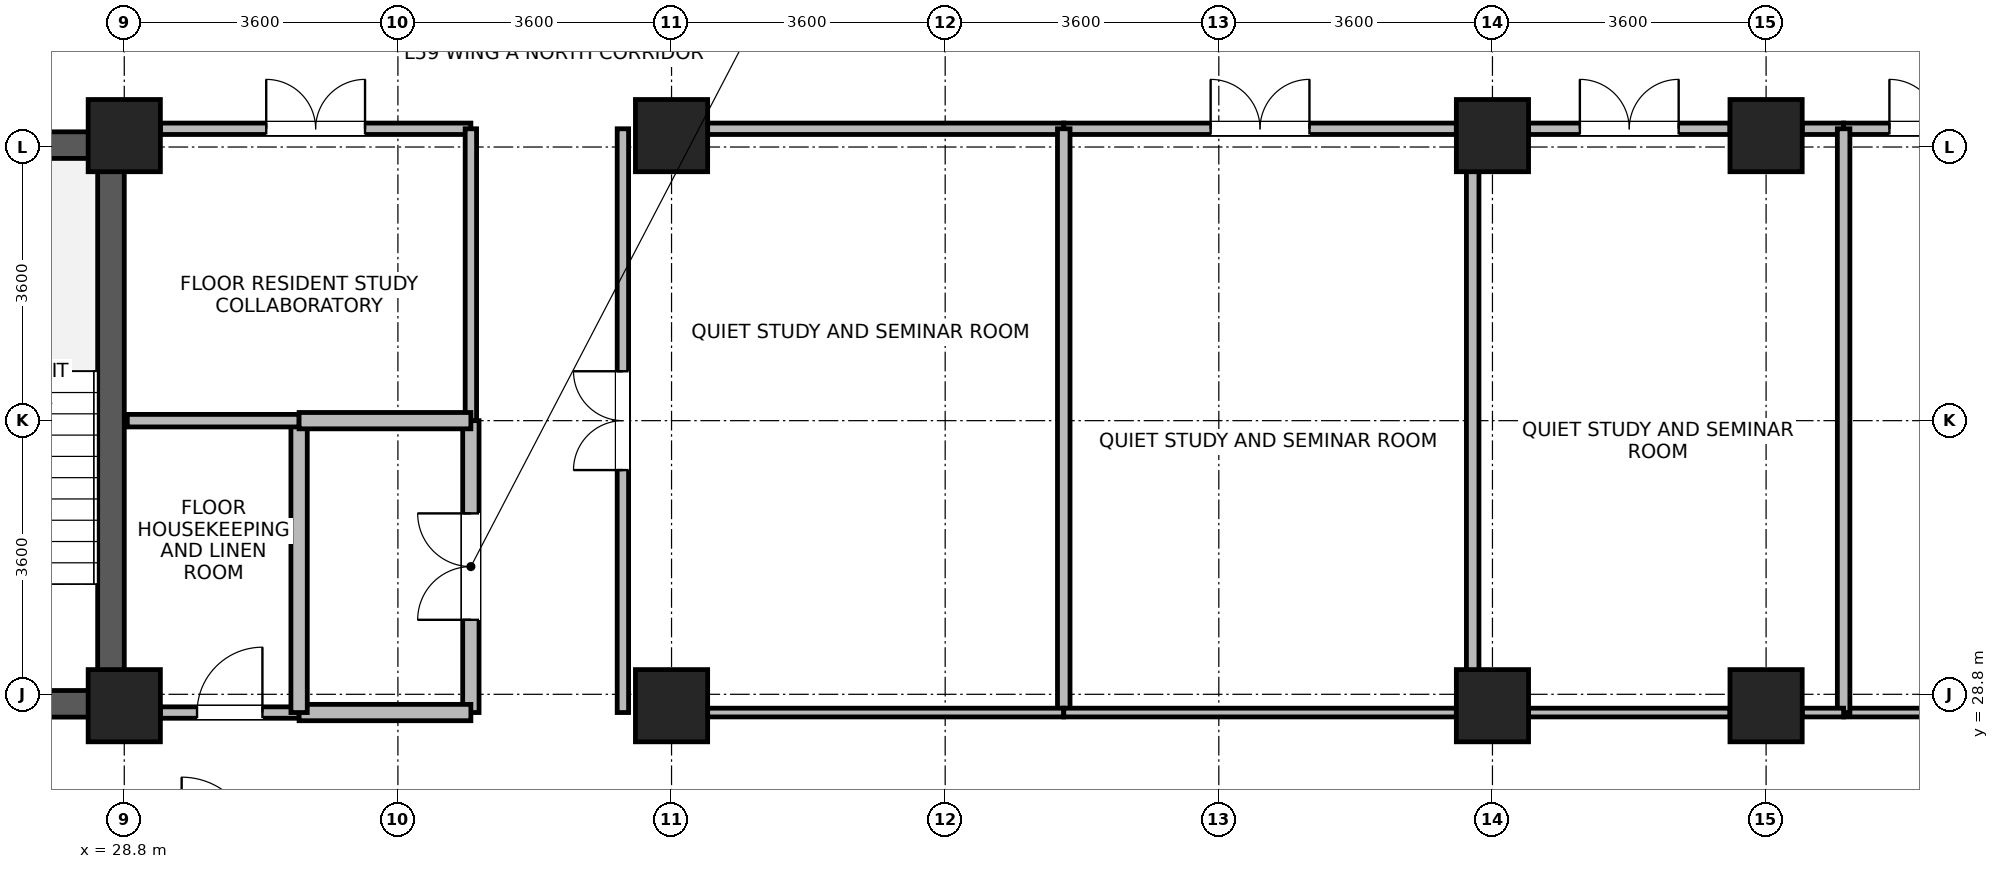
"""IFC4 building model, lengths in metres.
Left out: names, types, materials, properties, quantities, classifications, styles, units other than length and angle.
Written with IfcOpenShell. Run it as: python <this file> out.ifc"""

import sys

from ifc_helpers import new_model, si_unit, direction, frame, frame_2d, origin, origin_2d, place, context, subcontext, project, spatial, rectangle, extrude, source, transform, mapped, element, fill, save


model = new_model("IFC4")
c1 = context("Model", 3, precision=1e-05, world=origin(), true_north=direction((0.0, 1.0)))
c2 = subcontext(c1, "Body", "Model", "MODEL_VIEW")
j1 = project(units=[si_unit("LENGTHUNIT", "METRE"), si_unit("PLANEANGLEUNIT", "RADIAN")], contexts=[c1])
p1 = place(None, origin())
s1 = spatial("IfcSite", under=j1, at=p1, CompositionType="ELEMENT")
p2 = place(p1, origin())
s2 = spatial("IfcBuilding", under=s1, at=p2, CompositionType="ELEMENT")
p3 = place(p2, frame((0.0, 0.0, 231.4)))
s3 = spatial("IfcBuildingStorey", under=s2, at=p3, CompositionType="ELEMENT", Elevation=231.4)
p4 = place(p3, frame((28.625, 28.5, 0.0), z_axis=(0.0, 0.0, 1.0), x_axis=(0.0, 1.0, 0.0)))
e1 = element("IfcWall", 1, at=p4, inside=s3, PredefinedType="SHEAR", context=c2, shape_type="SweptSolid", body=[
    extrude(rectangle(XDim=7.7, YDim=0.35, at=frame_2d((3.85, 0.0))), origin(), (0.0, 0.0, 1.0), 3.44),
])
for number, where, z_axis, x_axis in (
    (2, (25.25, 28.675, 0.0), (0.0, 0.0, 1.0), (1.0, 0.0, 0.0)),
    (3, (25.25, 36.025, 0.0), (0.0, 0.0, 1.0), (1.0, 0.0, 0.0)),
):
    element("IfcWall", number, at=place(p3, frame(where, z_axis=z_axis, x_axis=x_axis)), inside=s3, PredefinedType="SHEAR", context=c2, shape_type="SweptSolid", body=[
        extrude(rectangle(XDim=3.2, YDim=0.35, at=frame_2d((1.6, 0.0))), origin(), (0.0, 0.0, 1.0), 3.44),
    ])
m1 = source(origin(), c2, "Body", "SweptSolid", [
    extrude(rectangle(XDim=0.95, YDim=0.95, at=origin_2d()), origin(), (0.0, 0.0, 1.0), 3.7),
])
for number, where, z_axis, x_axis in (
    (4, (28.8, 28.65, 0.0), (0.0, 0.0, 1.0), (1.0, 0.0, 0.0)),
    (5, (28.8, 36.15, 0.0), (0.0, 0.0, 1.0), (1.0, 0.0, 0.0)),
    (6, (36.0, 28.65, 0.0), (0.0, 0.0, 1.0), (1.0, 0.0, 0.0)),
    (7, (36.0, 36.15, 0.0), (0.0, 0.0, 1.0), (1.0, 0.0, 0.0)),
    (8, (46.8, 28.65, 0.0), (0.0, 0.0, 1.0), (1.0, 0.0, 0.0)),
    (9, (46.8, 36.15, 0.0), (0.0, 0.0, 1.0), (1.0, 0.0, 0.0)),
    (10, (50.4, 28.65, 0.0), (0.0, 0.0, 1.0), (1.0, 0.0, 0.0)),
    (11, (50.4, 36.15, 0.0), (0.0, 0.0, 1.0), (1.0, 0.0, 0.0)),
):
    element("IfcColumn", number, at=place(p3, frame(where, z_axis=z_axis, x_axis=x_axis)), inside=s3, PredefinedType="COLUMN", context=c2, shape_type="MappedRepresentation", body=[
        mapped(m1, transform((0.0, 0.0, 0.0), x_axis=(1.0, 0.0, 0.0), y_axis=(0.0, 1.0, 0.0), z_axis=(0.0, 0.0, 1.0), scale=1.0)),
    ])
p5 = place(p3, frame((51.42, 36.24, 0.0), z_axis=(0.0, 0.0, 1.0), x_axis=(1.0, 0.0, 0.0)))
e12 = element("IfcWall", 12, at=p5, inside=s3, PredefinedType="PARTITIONING", context=c2, shape_type="SweptSolid", body=[
    extrude(rectangle(XDim=2.505, YDim=0.15, at=frame_2d((1.252, 0.0))), origin(), (0.0, 0.0, 1.0), 2.87),
])
p6 = place(p5, frame((0.603, 0.0, 0.0)))
e13 = element("IfcOpeningElement", 13, at=p6, cuts=e12, PredefinedType="OPENING", context=c2, shape_type="SweptSolid", body=[
    extrude(rectangle(XDim=1.3, YDim=2.12, at=frame_2d((0.65, 1.06))), frame((0.0, 0.085, 0.0), z_axis=(0.0, -1.0, 0.0), x_axis=(1.0, 0.0, 0.0)), (0.0, 0.0, 1.0), 0.17),
])
p7 = place(p3, frame((35.36, 28.56, 0.0), z_axis=(0.0, 0.0, 1.0), x_axis=(0.0, 1.0, 0.0)))
e14 = element("IfcWall", 14, at=p7, inside=s3, PredefinedType="PARTITIONING", context=c2, shape_type="SweptSolid", body=[
    extrude(rectangle(XDim=7.68, YDim=0.15, at=frame_2d((3.84, 0.0))), origin(), (0.0, 0.0, 1.0), 3.42),
])
p8 = place(p7, frame((3.19, 0.0, 0.0)))
e15 = element("IfcOpeningElement", 15, at=p8, cuts=e14, PredefinedType="OPENING", context=c2, shape_type="SweptSolid", body=[
    extrude(rectangle(XDim=1.3, YDim=2.12, at=frame_2d((0.65, 1.06))), frame((0.0, 0.085, 0.0), z_axis=(0.0, -1.0, 0.0), x_axis=(1.0, 0.0, 0.0)), (0.0, 0.0, 1.0), 0.17),
])
p9 = place(p3, frame((36.475, 36.24, 0.0), z_axis=(0.0, 0.0, 1.0), x_axis=(1.0, 0.0, 0.0)))
e16 = element("IfcWall", 16, at=p9, inside=s3, PredefinedType="PARTITIONING", context=c2, shape_type="SweptSolid", body=[
    extrude(rectangle(XDim=4.685, YDim=0.15, at=frame_2d((2.342, 0.0))), origin(), (0.0, 0.0, 1.0), 2.87),
])
p10 = place(p3, frame((41.16, 36.24, 0.0), z_axis=(0.0, 0.0, 1.0), x_axis=(1.0, 0.0, 0.0)))
e17 = element("IfcWall", 17, at=p10, inside=s3, PredefinedType="PARTITIONING", context=c2, shape_type="SweptSolid", body=[
    extrude(rectangle(XDim=5.165, YDim=0.15, at=frame_2d((2.583, 0.0))), origin(), (0.0, 0.0, 1.0), 2.87),
])
p11 = place(p10, frame((1.933, 0.0, 0.0)))
e18 = element("IfcOpeningElement", 18, at=p11, cuts=e17, PredefinedType="OPENING", context=c2, shape_type="SweptSolid", body=[
    extrude(rectangle(XDim=1.3, YDim=2.12, at=frame_2d((0.65, 1.06))), frame((0.0, 0.085, 0.0), z_axis=(0.0, -1.0, 0.0), x_axis=(1.0, 0.0, 0.0)), (0.0, 0.0, 1.0), 0.17),
])
p12 = place(p3, frame((47.275, 36.24, 0.0), z_axis=(0.0, 0.0, 1.0), x_axis=(1.0, 0.0, 0.0)))
e19 = element("IfcWall", 19, at=p12, inside=s3, PredefinedType="PARTITIONING", context=c2, shape_type="SweptSolid", body=[
    extrude(rectangle(XDim=2.65, YDim=0.15, at=frame_2d((1.325, 0.0))), origin(), (0.0, 0.0, 1.0), 2.87),
])
p13 = place(p12, frame((0.675, 0.0, 0.0)))
e20 = element("IfcOpeningElement", 20, at=p13, cuts=e19, PredefinedType="OPENING", context=c2, shape_type="SweptSolid", body=[
    extrude(rectangle(XDim=1.3, YDim=2.12, at=frame_2d((0.65, 1.06))), frame((0.0, 0.085, 0.0), z_axis=(0.0, -1.0, 0.0), x_axis=(1.0, 0.0, 0.0)), (0.0, 0.0, 1.0), 0.17),
])
p14 = place(p3, frame((50.875, 36.24, 0.0), z_axis=(0.0, 0.0, 1.0), x_axis=(1.0, 0.0, 0.0)))
e21 = element("IfcWall", 21, at=p14, inside=s3, PredefinedType="PARTITIONING", context=c2, shape_type="SweptSolid", body=[
    extrude(rectangle(XDim=0.545, YDim=0.15, at=frame_2d((0.272, 0.0))), origin(), (0.0, 0.0, 1.0), 2.87),
])
p15 = place(p3, frame((29.275, 36.24, 0.0), z_axis=(0.0, 0.0, 1.0), x_axis=(1.0, 0.0, 0.0)))
e22 = element("IfcWall", 22, at=p15, inside=s3, PredefinedType="PARTITIONING", context=c2, shape_type="SweptSolid", body=[
    extrude(rectangle(XDim=4.085, YDim=0.15, at=frame_2d((2.042, 0.0))), origin(), (0.0, 0.0, 1.0), 2.87),
])
p16 = place(p15, frame((1.393, 0.0, 0.0)))
e23 = element("IfcOpeningElement", 23, at=p16, cuts=e22, PredefinedType="OPENING", context=c2, shape_type="SweptSolid", body=[
    extrude(rectangle(XDim=1.3, YDim=2.12, at=frame_2d((0.65, 1.06))), frame((0.0, 0.085, 0.0), z_axis=(0.0, -1.0, 0.0), x_axis=(1.0, 0.0, 0.0)), (0.0, 0.0, 1.0), 0.17),
])
p17 = place(p3, frame((33.36, 32.4, 0.0), z_axis=(0.0, 0.0, 1.0), x_axis=(0.0, 1.0, 0.0)))
e24 = element("IfcWall", 24, at=p17, inside=s3, PredefinedType="PARTITIONING", context=c2, shape_type="SweptSolid", body=[
    extrude(rectangle(XDim=3.84, YDim=0.15, at=frame_2d((1.92, 0.0))), origin(), (0.0, 0.0, 1.0), 3.42),
])
p18 = place(p3, frame((33.36, 28.56, 0.0), z_axis=(0.0, 0.0, 1.0), x_axis=(0.0, 1.0, 0.0)))
e25 = element("IfcWall", 25, at=p18, inside=s3, PredefinedType="PARTITIONING", context=c2, shape_type="SweptSolid", body=[
    extrude(rectangle(XDim=3.84, YDim=0.215, at=frame_2d((1.92, 0.0))), origin(), (0.0, 0.0, 1.0), 3.42),
])
p19 = place(p18, frame((1.22, 0.0, 0.0)))
e26 = element("IfcOpeningElement", 26, at=p19, cuts=e25, PredefinedType="OPENING", context=c2, shape_type="SweptSolid", body=[
    extrude(rectangle(XDim=1.4, YDim=2.15, at=frame_2d((0.7, 1.075))), frame((0.0, 0.118, 0.0), z_axis=(0.0, -1.0, 0.0), x_axis=(1.0, 0.0, 0.0)), (0.0, 0.0, 1.0), 0.235),
])
p20 = place(p3, frame((29.275, 28.56, 0.0), z_axis=(0.0, 0.0, 1.0), x_axis=(1.0, 0.0, 0.0)))
e27 = element("IfcWall", 27, at=p20, inside=s3, PredefinedType="PARTITIONING", context=c2, shape_type="SweptSolid", body=[
    extrude(rectangle(XDim=1.825, YDim=0.15, at=frame_2d((0.913, 0.0))), origin(), (0.0, 0.0, 1.0), 2.87),
])
p21 = place(p20, frame((0.482, 0.0, 0.0)))
e28 = element("IfcOpeningElement", 28, at=p21, cuts=e27, PredefinedType="OPENING", context=c2, shape_type="SweptSolid", body=[
    extrude(rectangle(XDim=0.86, YDim=2.02, at=frame_2d((0.43, 1.01))), frame((0.0, 0.085, 0.0), z_axis=(0.0, -1.0, 0.0), x_axis=(1.0, 0.0, 0.0)), (0.0, 0.0, 1.0), 0.17),
])
p22 = place(p3, frame((31.1, 28.56, 0.0), z_axis=(0.0, 0.0, 1.0), x_axis=(1.0, 0.0, 0.0)))
e29 = element("IfcWall", 29, at=p22, inside=s3, PredefinedType="PARTITIONING", context=c2, shape_type="SweptSolid", body=[
    extrude(rectangle(XDim=2.26, YDim=0.215, at=frame_2d((1.13, 0.0))), origin(), (0.0, 0.0, 1.0), 2.87),
])
p23 = place(p3, frame((51.42, 28.56, 0.0), z_axis=(0.0, 0.0, 1.0), x_axis=(1.0, 0.0, 0.0)))
e30 = element("IfcWall", 30, at=p23, inside=s3, PredefinedType="PARTITIONING", context=c2, shape_type="SweptSolid", body=[
    extrude(rectangle(XDim=2.505, YDim=0.115, at=frame_2d((1.252, 0.0))), origin(), (0.0, 0.0, 1.0), 2.87),
])
for number, where, z_axis, x_axis in (
    (31, (41.16, 28.56, 0.0), (0.0, 0.0, 1.0), (0.0, 1.0, 0.0)),
    (32, (46.54, 28.56, 0.0), (0.0, 0.0, 1.0), (0.0, 1.0, 0.0)),
    (33, (51.42, 28.56, 0.0), (0.0, 0.0, 1.0), (0.0, 1.0, 0.0)),
):
    element("IfcWall", number, at=place(p3, frame(where, z_axis=z_axis, x_axis=x_axis)), inside=s3, PredefinedType="PARTITIONING", context=c2, shape_type="SweptSolid", body=[
        extrude(rectangle(XDim=7.68, YDim=0.165, at=frame_2d((3.84, 0.0))), origin(), (0.0, 0.0, 1.0), 3.42),
    ])
p24 = place(p3, frame((36.475, 28.56, 0.0), z_axis=(0.0, 0.0, 1.0), x_axis=(1.0, 0.0, 0.0)))
e34 = element("IfcWall", 34, at=p24, inside=s3, PredefinedType="PARTITIONING", context=c2, shape_type="SweptSolid", body=[
    extrude(rectangle(XDim=4.685, YDim=0.115, at=frame_2d((2.342, 0.0))), origin(), (0.0, 0.0, 1.0), 2.87),
])
p25 = place(p3, frame((41.16, 28.56, 0.0), z_axis=(0.0, 0.0, 1.0), x_axis=(1.0, 0.0, 0.0)))
e35 = element("IfcWall", 35, at=p25, inside=s3, PredefinedType="PARTITIONING", context=c2, shape_type="SweptSolid", body=[
    extrude(rectangle(XDim=5.165, YDim=0.115, at=frame_2d((2.583, 0.0))), origin(), (0.0, 0.0, 1.0), 2.87),
])
p26 = place(p3, frame((47.275, 28.56, 0.0), z_axis=(0.0, 0.0, 1.0), x_axis=(1.0, 0.0, 0.0)))
e36 = element("IfcWall", 36, at=p26, inside=s3, PredefinedType="PARTITIONING", context=c2, shape_type="SweptSolid", body=[
    extrude(rectangle(XDim=2.65, YDim=0.115, at=frame_2d((1.325, 0.0))), origin(), (0.0, 0.0, 1.0), 2.87),
])
p27 = place(p3, frame((50.875, 28.56, 0.0), z_axis=(0.0, 0.0, 1.0), x_axis=(1.0, 0.0, 0.0)))
e37 = element("IfcWall", 37, at=p27, inside=s3, PredefinedType="PARTITIONING", context=c2, shape_type="SweptSolid", body=[
    extrude(rectangle(XDim=0.545, YDim=0.115, at=frame_2d((0.272, 0.0))), origin(), (0.0, 0.0, 1.0), 2.87),
])
p28 = place(p3, frame((31.1, 28.56, 0.0), z_axis=(0.0, 0.0, 1.0), x_axis=(0.0, 1.0, 0.0)))
e38 = element("IfcWall", 38, at=p28, inside=s3, PredefinedType="PARTITIONING", context=c2, shape_type="SweptSolid", body=[
    extrude(rectangle(XDim=3.84, YDim=0.215, at=frame_2d((1.92, 0.0))), origin(), (0.0, 0.0, 1.0), 3.42),
])
p29 = place(p3, frame((28.84, 32.4, 0.0), z_axis=(0.0, 0.0, 1.0), x_axis=(1.0, 0.0, 0.0)))
e39 = element("IfcWall", 39, at=p29, inside=s3, PredefinedType="PARTITIONING", context=c2, shape_type="SweptSolid", body=[
    extrude(rectangle(XDim=2.26, YDim=0.165, at=frame_2d((1.13, 0.0))), origin(), (0.0, 0.0, 1.0), 3.42),
])
p30 = place(p3, frame((31.1, 32.4, 0.0), z_axis=(0.0, 0.0, 1.0), x_axis=(1.0, 0.0, 0.0)))
e40 = element("IfcWall", 40, at=p30, inside=s3, PredefinedType="PARTITIONING", context=c2, shape_type="SweptSolid", body=[
    extrude(rectangle(XDim=2.26, YDim=0.215, at=frame_2d((1.13, 0.0))), origin(), (0.0, 0.0, 1.0), 3.42),
])
p31 = place(p6, origin())
e41 = element("IfcDoor", 41, at=p31, inside=s3, OperationType="DOUBLE_DOOR_SINGLE_SWING", PredefinedType="DOOR", context=c2, shape_type="SweptSolid", body=[
    extrude(rectangle(XDim=1.3, YDim=2.12, at=frame_2d((0.65, 1.06))), frame((0.0, 0.025, 0.0), z_axis=(0.0, -1.0, 0.0), x_axis=(1.0, 0.0, 0.0)), (0.0, 0.0, 1.0), 0.05),
])
fill(e13, e41)
p32 = place(p8, origin())
e42 = element("IfcDoor", 42, at=p32, inside=s3, OperationType="DOUBLE_DOOR_SINGLE_SWING", PredefinedType="DOOR", context=c2, shape_type="SweptSolid", body=[
    extrude(rectangle(XDim=1.3, YDim=2.12, at=frame_2d((0.65, 1.06))), frame((0.0, 0.025, 0.0), z_axis=(0.0, -1.0, 0.0), x_axis=(1.0, 0.0, 0.0)), (0.0, 0.0, 1.0), 0.05),
])
fill(e15, e42)
p33 = place(p11, origin())
e43 = element("IfcDoor", 43, at=p33, inside=s3, OperationType="DOUBLE_DOOR_SINGLE_SWING", PredefinedType="DOOR", context=c2, shape_type="SweptSolid", body=[
    extrude(rectangle(XDim=1.3, YDim=2.12, at=frame_2d((0.65, 1.06))), frame((0.0, 0.025, 0.0), z_axis=(0.0, -1.0, 0.0), x_axis=(1.0, 0.0, 0.0)), (0.0, 0.0, 1.0), 0.05),
])
fill(e18, e43)
p34 = place(p13, origin())
e44 = element("IfcDoor", 44, at=p34, inside=s3, OperationType="DOUBLE_DOOR_SINGLE_SWING", PredefinedType="DOOR", context=c2, shape_type="SweptSolid", body=[
    extrude(rectangle(XDim=1.3, YDim=2.12, at=frame_2d((0.65, 1.06))), frame((0.0, 0.025, 0.0), z_axis=(0.0, -1.0, 0.0), x_axis=(1.0, 0.0, 0.0)), (0.0, 0.0, 1.0), 0.05),
])
fill(e20, e44)
p35 = place(p16, origin())
e45 = element("IfcDoor", 45, at=p35, inside=s3, OperationType="DOUBLE_DOOR_SINGLE_SWING", PredefinedType="DOOR", context=c2, shape_type="SweptSolid", body=[
    extrude(rectangle(XDim=1.3, YDim=2.12, at=frame_2d((0.65, 1.06))), frame((0.0, 0.025, 0.0), z_axis=(0.0, -1.0, 0.0), x_axis=(1.0, 0.0, 0.0)), (0.0, 0.0, 1.0), 0.05),
])
fill(e23, e45)
p36 = place(p19, origin())
e46 = element("IfcDoor", 46, at=p36, inside=s3, OperationType="DOUBLE_DOOR_SINGLE_SWING", PredefinedType="DOOR", context=c2, shape_type="SweptSolid", body=[
    extrude(rectangle(XDim=1.4, YDim=2.15, at=frame_2d((0.7, 1.075))), frame((0.0, 0.025, 0.0), z_axis=(0.0, -1.0, 0.0), x_axis=(1.0, 0.0, 0.0)), (0.0, 0.0, 1.0), 0.05),
])
fill(e26, e46)
p37 = place(p21, origin())
e47 = element("IfcDoor", 47, at=p37, inside=s3, OperationType="SINGLE_SWING_RIGHT", PredefinedType="DOOR", context=c2, shape_type="SweptSolid", body=[
    extrude(rectangle(XDim=0.86, YDim=2.02, at=frame_2d((0.43, 1.01))), frame((0.0, 0.025, 0.0), z_axis=(0.0, -1.0, 0.0), x_axis=(1.0, 0.0, 0.0)), (0.0, 0.0, 1.0), 0.05),
])
fill(e28, e47)
save(model, sys.argv[1])
